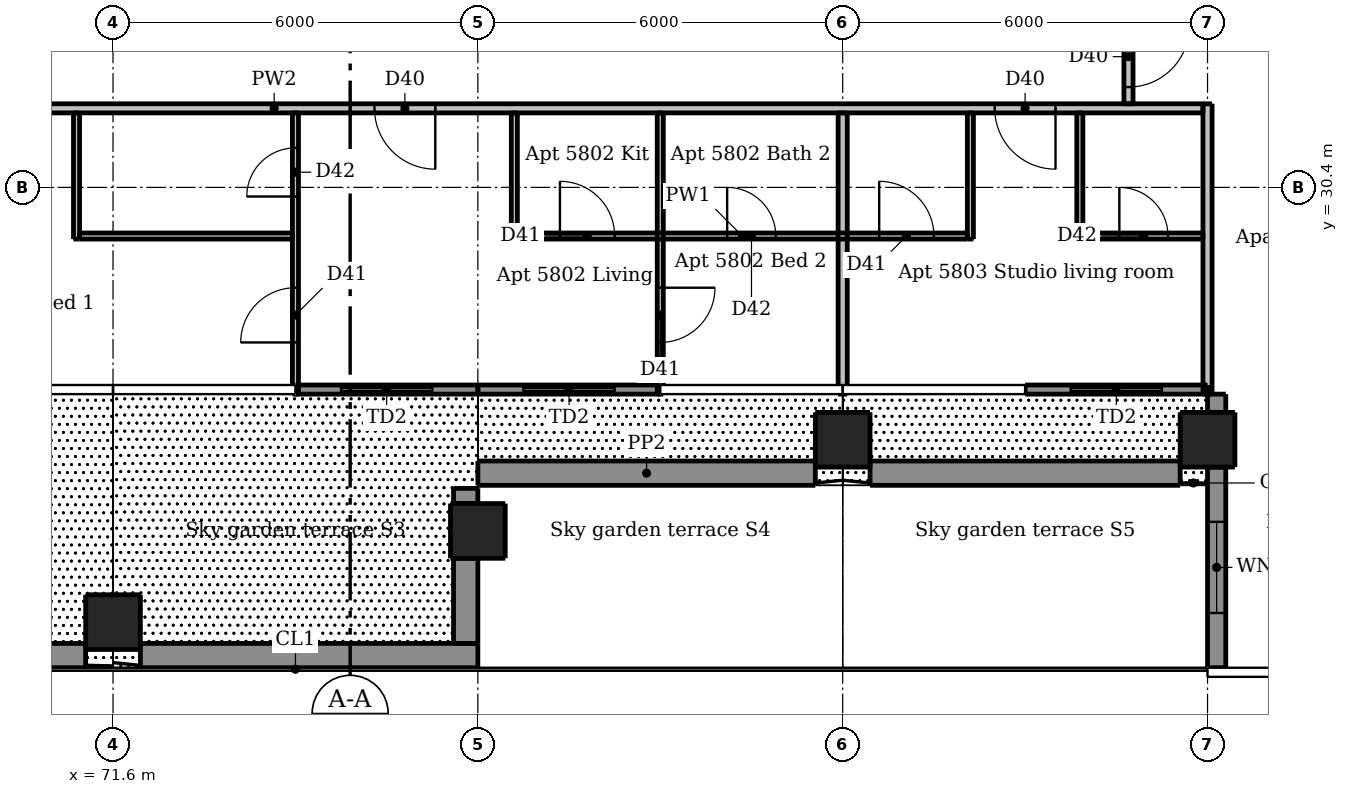
"""IFC4 building model, lengths in metres.
Left out: names, types, materials, properties, quantities, classifications, styles, units other than length and angle.
Written with IfcOpenShell. Run it as: python <this file> out.ifc"""

import sys

from ifc_helpers import new_model, si_unit, direction, frame, frame_2d, origin, origin_2d, place, context, subcontext, project, spatial, rectangle, extrude, element, fill, save


model = new_model("IFC4")
c1 = context("Model", 3, precision=1e-05, world=origin(), true_north=direction((0.0, 1.0)))
c2 = subcontext(c1, "Body", "Model", "MODEL_VIEW")
j1 = project(units=[si_unit("LENGTHUNIT", "METRE"), si_unit("PLANEANGLEUNIT", "RADIAN")], contexts=[c1])
p1 = place(None, origin())
s1 = spatial("IfcSite", under=j1, at=p1, CompositionType="ELEMENT")
p2 = place(p1, origin())
s2 = spatial("IfcBuilding", under=s1, at=p2, CompositionType="ELEMENT")
p3 = place(p2, frame((0.0, 0.0, 216.7)))
s3 = spatial("IfcBuildingStorey", under=s2, at=p3, CompositionType="ELEMENT", Elevation=216.7)
for number, where, z_axis, x_axis in (
    (1, (71.6, 23.25, 0.0), (0.0, 0.0, 1.0), (1.0, 0.0, 0.0)),
    (2, (77.6, 24.75, 0.0), (0.0, 0.0, 1.0), (1.0, 0.0, 0.0)),
    (3, (83.6, 26.25, 0.0), (0.0, 0.0, 1.0), (1.0, 0.0, 0.0)),
):
    element("IfcColumn", number, at=place(p3, frame(where, z_axis=z_axis, x_axis=x_axis)), inside=s3, PredefinedType="COLUMN", context=c2, shape_type="SweptSolid", body=[
        extrude(rectangle(XDim=0.9, YDim=0.9, at=origin_2d()), origin(), (0.0, 0.0, 1.0), 3.3),
    ])
p4 = place(p3, frame((89.6, 26.25, 0.0), z_axis=(0.0, 0.0, 1.0), x_axis=(1.0, 0.0, 0.0)))
e4 = element("IfcColumn", 4, at=p4, inside=s3, PredefinedType="COLUMN", context=c2, shape_type="SweptSolid", body=[
    extrude(rectangle(XDim=0.9, YDim=0.9, at=origin_2d()), origin(), (0.0, 0.0, 1.0), 3.05),
])
p5 = place(p3, frame((89.75, 27.0, 0.0), z_axis=(0.0, 0.0, 1.0), x_axis=(0.0, -1.0, 0.0)))
e5 = element("IfcWall", 5, at=p5, inside=s3, PredefinedType="SOLIDWALL", context=c2, shape_type="SweptSolid", body=[
    extrude(rectangle(XDim=0.3, YDim=0.3, at=frame_2d((0.15, 0.0))), origin(), (0.0, 0.0, 1.0), 3.05),
])
p6 = place(p3, frame((89.75, 25.8, 0.0), z_axis=(0.0, 0.0, 1.0), x_axis=(0.0, -1.0, 0.0)))
e6 = element("IfcWall", 6, at=p6, inside=s3, PredefinedType="SOLIDWALL", context=c2, shape_type="SweptSolid", body=[
    extrude(rectangle(XDim=3.3, YDim=0.3, at=frame_2d((1.65, 0.0))), origin(), (0.0, 0.0, 1.0), 3.05),
])
p7 = place(p6, frame((0.9, 0.0, 0.9)))
e7 = element("IfcOpeningElement", 7, at=p7, cuts=e6, PredefinedType="OPENING", context=c2, shape_type="SweptSolid", body=[
    extrude(rectangle(XDim=1.5, YDim=1.5, at=frame_2d((0.75, 0.75))), frame((0.0, 0.16, 0.0), z_axis=(0.0, -1.0, 0.0), x_axis=(1.0, 0.0, 0.0)), (0.0, 0.0, 1.0), 0.32),
])
p8 = place(p3, frame((74.6, 27.075, 0.0), z_axis=(0.0, 0.0, 1.0), x_axis=(1.0, 0.0, 0.0)))
e8 = element("IfcWall", 8, at=p8, inside=s3, PredefinedType="SOLIDWALL", context=c2, shape_type="SweptSolid", body=[
    extrude(rectangle(XDim=3.0, YDim=0.15, at=frame_2d((1.5, 0.0))), origin(), (0.0, 0.0, 1.0), 3.05),
])
p9 = place(p8, frame((0.75, 0.0, 0.0)))
e9 = element("IfcOpeningElement", 9, at=p9, cuts=e8, PredefinedType="OPENING", context=c2, shape_type="SweptSolid", body=[
    extrude(rectangle(XDim=1.5, YDim=2.4, at=frame_2d((0.75, 1.2))), frame((0.0, 0.085, 0.0), z_axis=(0.0, -1.0, 0.0), x_axis=(1.0, 0.0, 0.0)), (0.0, 0.0, 1.0), 0.17),
])
p10 = place(p3, frame((77.6, 27.075, 0.0), z_axis=(0.0, 0.0, 1.0), x_axis=(1.0, 0.0, 0.0)))
e10 = element("IfcWall", 10, at=p10, inside=s3, PredefinedType="SOLIDWALL", context=c2, shape_type="SweptSolid", body=[
    extrude(rectangle(XDim=3.0, YDim=0.15, at=frame_2d((1.5, 0.0))), origin(), (0.0, 0.0, 1.0), 3.05),
])
p11 = place(p10, frame((0.75, 0.0, 0.0)))
e11 = element("IfcOpeningElement", 11, at=p11, cuts=e10, PredefinedType="OPENING", context=c2, shape_type="SweptSolid", body=[
    extrude(rectangle(XDim=1.5, YDim=2.4, at=frame_2d((0.75, 1.2))), frame((0.0, 0.085, 0.0), z_axis=(0.0, -1.0, 0.0), x_axis=(1.0, 0.0, 0.0)), (0.0, 0.0, 1.0), 0.17),
])
p12 = place(p3, frame((86.6, 27.075, 0.0), z_axis=(0.0, 0.0, 1.0), x_axis=(1.0, 0.0, 0.0)))
e12 = element("IfcWall", 12, at=p12, inside=s3, PredefinedType="SOLIDWALL", context=c2, shape_type="SweptSolid", body=[
    extrude(rectangle(XDim=3.0, YDim=0.15, at=frame_2d((1.5, 0.0))), origin(), (0.0, 0.0, 1.0), 3.05),
])
p13 = place(p12, frame((0.75, 0.0, 0.0)))
e13 = element("IfcOpeningElement", 13, at=p13, cuts=e12, PredefinedType="OPENING", context=c2, shape_type="SweptSolid", body=[
    extrude(rectangle(XDim=1.5, YDim=2.4, at=frame_2d((0.75, 1.2))), frame((0.0, 0.085, 0.0), z_axis=(0.0, -1.0, 0.0), x_axis=(1.0, 0.0, 0.0)), (0.0, 0.0, 1.0), 0.17),
])
p14 = place(p3, frame((66.05, 22.7, 0.03), z_axis=(0.0, 0.0, 1.0), x_axis=(1.0, 0.0, 0.0)))
e14 = element("IfcWall", 14, at=p14, inside=s3, PredefinedType="PARAPET", context=c2, shape_type="SweptSolid", body=[
    extrude(rectangle(XDim=5.1, YDim=0.4, at=frame_2d((2.55, 0.0))), origin(), (0.0, 0.0, 1.0), 1.1),
])
p15 = place(p3, frame((72.05, 22.7, 0.03), z_axis=(0.0, 0.0, 1.0), x_axis=(1.0, 0.0, 0.0)))
e15 = element("IfcWall", 15, at=p15, inside=s3, PredefinedType="PARAPET", context=c2, shape_type="SweptSolid", body=[
    extrude(rectangle(XDim=5.55, YDim=0.4, at=frame_2d((2.775, 0.0))), origin(), (0.0, 0.0, 1.0), 1.1),
])
p16 = place(p3, frame((77.4, 22.9, 0.03), z_axis=(0.0, 0.0, 1.0), x_axis=(0.0, 1.0, 0.0)))
e16 = element("IfcWall", 16, at=p16, inside=s3, PredefinedType="PARAPET", context=c2, shape_type="SweptSolid", body=[
    extrude(rectangle(XDim=1.4, YDim=0.4, at=frame_2d((0.7, 0.0))), origin(), (0.0, 0.0, 1.0), 1.1),
])
p17 = place(p3, frame((77.4, 25.2, 0.03), z_axis=(0.0, 0.0, 1.0), x_axis=(0.0, 1.0, 0.0)))
e17 = element("IfcWall", 17, at=p17, inside=s3, PredefinedType="PARAPET", context=c2, shape_type="SweptSolid", body=[
    extrude(rectangle(XDim=0.25, YDim=0.4, at=frame_2d((0.125, 0.0))), origin(), (0.0, 0.0, 1.0), 1.1),
])
p18 = place(p3, frame((77.6, 25.7, 0.03), z_axis=(0.0, 0.0, 1.0), x_axis=(1.0, 0.0, 0.0)))
e18 = element("IfcWall", 18, at=p18, inside=s3, PredefinedType="PARAPET", context=c2, shape_type="SweptSolid", body=[
    extrude(rectangle(XDim=5.55, YDim=0.4, at=frame_2d((2.775, 0.0))), origin(), (0.0, 0.0, 1.0), 1.1),
])
p19 = place(p3, frame((84.05, 25.7, 0.03), z_axis=(0.0, 0.0, 1.0), x_axis=(1.0, 0.0, 0.0)))
e19 = element("IfcWall", 19, at=p19, inside=s3, PredefinedType="PARAPET", context=c2, shape_type="SweptSolid", body=[
    extrude(rectangle(XDim=5.1, YDim=0.4, at=frame_2d((2.55, 0.0))), origin(), (0.0, 0.0, 1.0), 1.1),
])
p20 = place(p3, frame((71.0, 29.55, 0.0), z_axis=(0.0, 0.0, 1.0), x_axis=(0.0, 1.0, 0.0)))
e20 = element("IfcWall", 20, at=p20, inside=s3, PredefinedType="PARTITIONING", context=c2, shape_type="SweptSolid", body=[
    extrude(rectangle(XDim=2.075, YDim=0.1, at=frame_2d((1.038, 0.0))), origin(), (0.0, 0.0, 1.0), 3.05),
])
p21 = place(p3, frame((74.6, 27.0, 0.0), z_axis=(0.0, 0.0, 1.0), x_axis=(0.0, 1.0, 0.0)))
e21 = element("IfcWall", 21, at=p21, inside=s3, PredefinedType="PARTITIONING", context=c2, shape_type="SweptSolid", body=[
    extrude(rectangle(XDim=4.625, YDim=0.1, at=frame_2d((2.312, 0.0))), origin(), (0.0, 0.0, 1.0), 3.05),
])
p22 = place(p21, frame((0.85, 0.0, 0.0)))
e22 = element("IfcOpeningElement", 22, at=p22, cuts=e21, PredefinedType="OPENING", context=c2, shape_type="SweptSolid", body=[
    extrude(rectangle(XDim=0.9, YDim=2.1, at=frame_2d((0.45, 1.05))), frame((0.0, 0.06, 0.0), z_axis=(0.0, -1.0, 0.0), x_axis=(1.0, 0.0, 0.0)), (0.0, 0.0, 1.0), 0.12),
])
p23 = place(p21, frame((3.25, 0.0, 0.0)))
e23 = element("IfcOpeningElement", 23, at=p23, cuts=e21, PredefinedType="OPENING", context=c2, shape_type="SweptSolid", body=[
    extrude(rectangle(XDim=0.8, YDim=2.1, at=frame_2d((0.4, 1.05))), frame((0.0, 0.06, 0.0), z_axis=(0.0, -1.0, 0.0), x_axis=(1.0, 0.0, 0.0)), (0.0, 0.0, 1.0), 0.12),
])
p24 = place(p3, frame((78.2, 29.55, 0.0), z_axis=(0.0, 0.0, 1.0), x_axis=(0.0, 1.0, 0.0)))
e24 = element("IfcWall", 24, at=p24, inside=s3, PredefinedType="PARTITIONING", context=c2, shape_type="SweptSolid", body=[
    extrude(rectangle(XDim=2.075, YDim=0.1, at=frame_2d((1.038, 0.0))), origin(), (0.0, 0.0, 1.0), 3.05),
])
p25 = place(p3, frame((80.6, 31.625, 0.0), z_axis=(0.0, 0.0, 1.0), x_axis=(0.0, -1.0, 0.0)))
e25 = element("IfcWall", 25, at=p25, inside=s3, PredefinedType="PARTITIONING", context=c2, shape_type="SweptSolid", body=[
    extrude(rectangle(XDim=4.625, YDim=0.1, at=frame_2d((2.312, 0.0))), origin(), (0.0, 0.0, 1.0), 3.05),
])
p26 = place(p25, frame((2.875, 0.0, 0.0)))
e26 = element("IfcOpeningElement", 26, at=p26, cuts=e25, PredefinedType="OPENING", context=c2, shape_type="SweptSolid", body=[
    extrude(rectangle(XDim=0.9, YDim=2.1, at=frame_2d((0.45, 1.05))), frame((0.0, 0.06, 0.0), z_axis=(0.0, -1.0, 0.0), x_axis=(1.0, 0.0, 0.0)), (0.0, 0.0, 1.0), 0.12),
])
for number, where, z_axis, x_axis in (
    (27, (85.7, 29.55, 0.0), (0.0, 0.0, 1.0), (0.0, 1.0, 0.0)),
    (28, (87.5, 29.55, 0.0), (0.0, 0.0, 1.0), (0.0, 1.0, 0.0)),
):
    element("IfcWall", number, at=place(p3, frame(where, z_axis=z_axis, x_axis=x_axis)), inside=s3, PredefinedType="PARTITIONING", context=c2, shape_type="SweptSolid", body=[
        extrude(rectangle(XDim=2.075, YDim=0.1, at=frame_2d((1.038, 0.0))), origin(), (0.0, 0.0, 1.0), 3.05),
    ])
p27 = place(p3, frame((71.05, 29.6, 0.0), z_axis=(0.0, 0.0, 1.0), x_axis=(1.0, 0.0, 0.0)))
e29 = element("IfcWall", 29, at=p27, inside=s3, PredefinedType="PARTITIONING", context=c2, shape_type="SweptSolid", body=[
    extrude(rectangle(XDim=3.5, YDim=0.1, at=frame_2d((1.75, 0.0))), origin(), (0.0, 0.0, 1.0), 3.05),
])
p28 = place(p3, frame((78.25, 29.6, 0.0), z_axis=(0.0, 0.0, 1.0), x_axis=(1.0, 0.0, 0.0)))
e30 = element("IfcWall", 30, at=p28, inside=s3, PredefinedType="PARTITIONING", context=c2, shape_type="SweptSolid", body=[
    extrude(rectangle(XDim=7.4, YDim=0.1, at=frame_2d((3.7, 0.0))), origin(), (0.0, 0.0, 1.0), 3.05),
])
p29 = place(p28, frame((0.7, 0.0, 0.0)))
e31 = element("IfcOpeningElement", 31, at=p29, cuts=e30, PredefinedType="OPENING", context=c2, shape_type="SweptSolid", body=[
    extrude(rectangle(XDim=0.9, YDim=2.1, at=frame_2d((0.45, 1.05))), frame((0.0, 0.06, 0.0), z_axis=(0.0, -1.0, 0.0), x_axis=(1.0, 0.0, 0.0)), (0.0, 0.0, 1.0), 0.12),
])
p30 = place(p28, frame((3.45, 0.0, 0.0)))
e32 = element("IfcOpeningElement", 32, at=p30, cuts=e30, PredefinedType="OPENING", context=c2, shape_type="SweptSolid", body=[
    extrude(rectangle(XDim=0.8, YDim=2.1, at=frame_2d((0.4, 1.05))), frame((0.0, 0.06, 0.0), z_axis=(0.0, -1.0, 0.0), x_axis=(1.0, 0.0, 0.0)), (0.0, 0.0, 1.0), 0.12),
])
p31 = place(p28, frame((5.95, 0.0, 0.0)))
e33 = element("IfcOpeningElement", 33, at=p31, cuts=e30, PredefinedType="OPENING", context=c2, shape_type="SweptSolid", body=[
    extrude(rectangle(XDim=0.9, YDim=2.1, at=frame_2d((0.45, 1.05))), frame((0.0, 0.06, 0.0), z_axis=(0.0, -1.0, 0.0), x_axis=(1.0, 0.0, 0.0)), (0.0, 0.0, 1.0), 0.12),
])
p32 = place(p3, frame((87.55, 29.6, 0.0), z_axis=(0.0, 0.0, 1.0), x_axis=(1.0, 0.0, 0.0)))
e34 = element("IfcWall", 34, at=p32, inside=s3, PredefinedType="PARTITIONING", context=c2, shape_type="SweptSolid", body=[
    extrude(rectangle(XDim=1.975, YDim=0.1, at=frame_2d((0.987, 0.0))), origin(), (0.0, 0.0, 1.0), 3.05),
])
p33 = place(p32, frame((0.6, 0.0, 0.0)))
e35 = element("IfcOpeningElement", 35, at=p33, cuts=e34, PredefinedType="OPENING", context=c2, shape_type="SweptSolid", body=[
    extrude(rectangle(XDim=0.8, YDim=2.1, at=frame_2d((0.4, 1.05))), frame((0.0, 0.06, 0.0), z_axis=(0.0, -1.0, 0.0), x_axis=(1.0, 0.0, 0.0)), (0.0, 0.0, 1.0), 0.12),
])
p34 = place(p3, frame((83.6, 27.0, 0.0), z_axis=(0.0, 0.0, 1.0), x_axis=(0.0, 1.0, 0.0)))
e36 = element("IfcWall", 36, at=p34, inside=s3, PredefinedType="PARTITIONING", context=c2, shape_type="SweptSolid", body=[
    extrude(rectangle(XDim=4.625, YDim=0.15, at=frame_2d((2.312, 0.0))), origin(), (0.0, 0.0, 1.0), 2.59),
])
p35 = place(p3, frame((88.3, 61.175, 0.0), z_axis=(0.0, 0.0, 1.0), x_axis=(0.0, -1.0, 0.0)))
e37 = element("IfcWall", 37, at=p35, inside=s3, PredefinedType="PARTITIONING", context=c2, shape_type="SweptSolid", body=[
    extrude(rectangle(XDim=29.4, YDim=0.15, at=frame_2d((14.7, 0.0))), origin(), (0.0, 0.0, 1.0), 3.05),
])
p36 = place(p35, frame((28.125, 0.0, 0.0)))
e38 = element("IfcOpeningElement", 38, at=p36, cuts=e37, PredefinedType="OPENING", context=c2, shape_type="SweptSolid", body=[
    extrude(rectangle(XDim=1.0, YDim=2.1, at=frame_2d((0.5, 1.05))), frame((0.0, 0.085, 0.0), z_axis=(0.0, -1.0, 0.0), x_axis=(1.0, 0.0, 0.0)), (0.0, 0.0, 1.0), 0.17),
])
p37 = place(p35, frame((15.275, 0.0, 0.0)))
e39 = element("IfcOpeningElement", 39, at=p37, cuts=e37, PredefinedType="OPENING", context=c2, shape_type="SweptSolid", body=[
    extrude(rectangle(XDim=1.0, YDim=2.1, at=frame_2d((0.5, 1.05))), frame((0.0, 0.085, 0.0), z_axis=(0.0, -1.0, 0.0), x_axis=(1.0, 0.0, 0.0)), (0.0, 0.0, 1.0), 0.17),
])
p38 = place(p35, frame((5.075, 0.0, 0.0)))
e40 = element("IfcOpeningElement", 40, at=p38, cuts=e37, PredefinedType="OPENING", context=c2, shape_type="SweptSolid", body=[
    extrude(rectangle(XDim=1.0, YDim=2.1, at=frame_2d((0.5, 1.05))), frame((0.0, 0.085, 0.0), z_axis=(0.0, -1.0, 0.0), x_axis=(1.0, 0.0, 0.0)), (0.0, 0.0, 1.0), 0.17),
])
p39 = place(p3, frame((89.6, 27.0, 0.0), z_axis=(0.0, 0.0, 1.0), x_axis=(0.0, 1.0, 0.0)))
e41 = element("IfcWall", 41, at=p39, inside=s3, PredefinedType="PARTITIONING", context=c2, shape_type="SweptSolid", body=[
    extrude(rectangle(XDim=4.775, YDim=0.15, at=frame_2d((2.387, 0.0))), origin(), (0.0, 0.0, 1.0), 2.516),
])
p40 = place(p3, frame((89.525, 31.7, 0.0), z_axis=(0.0, 0.0, 1.0), x_axis=(-1.0, 0.0, 0.0)))
e42 = element("IfcWall", 42, at=p40, inside=s3, PredefinedType="PARTITIONING", context=c2, shape_type="SweptSolid", body=[
    extrude(rectangle(XDim=30.55, YDim=0.15, at=frame_2d((15.275, 0.0))), origin(), (0.0, 0.0, 1.0), 3.05),
])
p41 = place(p40, frame((28.275, 0.0, 0.0)))
e43 = element("IfcOpeningElement", 43, at=p41, cuts=e42, PredefinedType="OPENING", context=c2, shape_type="SweptSolid", body=[
    extrude(rectangle(XDim=1.0, YDim=2.1, at=frame_2d((0.5, 1.05))), frame((0.0, 0.085, 0.0), z_axis=(0.0, -1.0, 0.0), x_axis=(1.0, 0.0, 0.0)), (0.0, 0.0, 1.0), 0.17),
])
p42 = place(p40, frame((12.625, 0.0, 0.0)))
e44 = element("IfcOpeningElement", 44, at=p42, cuts=e42, PredefinedType="OPENING", context=c2, shape_type="SweptSolid", body=[
    extrude(rectangle(XDim=1.0, YDim=2.1, at=frame_2d((0.5, 1.05))), frame((0.0, 0.085, 0.0), z_axis=(0.0, -1.0, 0.0), x_axis=(1.0, 0.0, 0.0)), (0.0, 0.0, 1.0), 0.17),
])
p43 = place(p40, frame((2.425, 0.0, 0.0)))
e45 = element("IfcOpeningElement", 45, at=p43, cuts=e42, PredefinedType="OPENING", context=c2, shape_type="SweptSolid", body=[
    extrude(rectangle(XDim=1.0, YDim=2.1, at=frame_2d((0.5, 1.05))), frame((0.0, 0.085, 0.0), z_axis=(0.0, -1.0, 0.0), x_axis=(1.0, 0.0, 0.0)), (0.0, 0.0, 1.0), 0.17),
])
p44 = place(p7, origin())
e46 = element("IfcWindow", 46, at=p44, inside=s3, PartitioningType="DOUBLE_PANEL_VERTICAL", PredefinedType="WINDOW", context=c2, shape_type="SweptSolid", body=[
    extrude(rectangle(XDim=1.5, YDim=1.5, at=frame_2d((0.75, 0.75))), frame((0.0, 0.03, 0.0), z_axis=(0.0, -1.0, 0.0), x_axis=(1.0, 0.0, 0.0)), (0.0, 0.0, 1.0), 0.06),
])
fill(e7, e46)
p45 = place(p9, origin())
e47 = element("IfcDoor", 47, at=p45, inside=s3, OperationType="DOUBLE_DOOR_SLIDING", PredefinedType="DOOR", context=c2, shape_type="SweptSolid", body=[
    extrude(rectangle(XDim=1.5, YDim=2.4, at=frame_2d((0.75, 1.2))), frame((0.0, 0.025, 0.0), z_axis=(0.0, -1.0, 0.0), x_axis=(1.0, 0.0, 0.0)), (0.0, 0.0, 1.0), 0.05),
])
fill(e9, e47)
p46 = place(p11, origin())
e48 = element("IfcDoor", 48, at=p46, inside=s3, OperationType="DOUBLE_DOOR_SLIDING", PredefinedType="DOOR", context=c2, shape_type="SweptSolid", body=[
    extrude(rectangle(XDim=1.5, YDim=2.4, at=frame_2d((0.75, 1.2))), frame((0.0, 0.025, 0.0), z_axis=(0.0, -1.0, 0.0), x_axis=(1.0, 0.0, 0.0)), (0.0, 0.0, 1.0), 0.05),
])
fill(e11, e48)
p47 = place(p13, origin())
e49 = element("IfcDoor", 49, at=p47, inside=s3, OperationType="DOUBLE_DOOR_SLIDING", PredefinedType="DOOR", context=c2, shape_type="SweptSolid", body=[
    extrude(rectangle(XDim=1.5, YDim=2.4, at=frame_2d((0.75, 1.2))), frame((0.0, 0.025, 0.0), z_axis=(0.0, -1.0, 0.0), x_axis=(1.0, 0.0, 0.0)), (0.0, 0.0, 1.0), 0.05),
])
fill(e13, e49)
p48 = place(p42, origin())
e50 = element("IfcDoor", 50, at=p48, inside=s3, OperationType="SINGLE_SWING_LEFT", PredefinedType="DOOR", context=c2, shape_type="SweptSolid", body=[
    extrude(rectangle(XDim=1.0, YDim=2.1, at=frame_2d((0.5, 1.05))), frame((0.0, 0.025, 0.0), z_axis=(0.0, -1.0, 0.0), x_axis=(1.0, 0.0, 0.0)), (0.0, 0.0, 1.0), 0.05),
])
fill(e44, e50)
p49 = place(p29, origin())
e51 = element("IfcDoor", 51, at=p49, inside=s3, OperationType="SINGLE_SWING_LEFT", PredefinedType="DOOR", context=c2, shape_type="SweptSolid", body=[
    extrude(rectangle(XDim=0.9, YDim=2.1, at=frame_2d((0.45, 1.05))), frame((0.0, 0.025, 0.0), z_axis=(0.0, -1.0, 0.0), x_axis=(1.0, 0.0, 0.0)), (0.0, 0.0, 1.0), 0.05),
])
fill(e31, e51)
p50 = place(p22, origin())
e52 = element("IfcDoor", 52, at=p50, inside=s3, OperationType="SINGLE_SWING_LEFT", PredefinedType="DOOR", context=c2, shape_type="SweptSolid", body=[
    extrude(rectangle(XDim=0.9, YDim=2.1, at=frame_2d((0.45, 1.05))), frame((0.0, 0.025, 0.0), z_axis=(0.0, -1.0, 0.0), x_axis=(1.0, 0.0, 0.0)), (0.0, 0.0, 1.0), 0.05),
])
fill(e22, e52)
p51 = place(p23, origin())
e53 = element("IfcDoor", 53, at=p51, inside=s3, OperationType="SINGLE_SWING_LEFT", PredefinedType="DOOR", context=c2, shape_type="SweptSolid", body=[
    extrude(rectangle(XDim=0.8, YDim=2.1, at=frame_2d((0.4, 1.05))), frame((0.0, 0.025, 0.0), z_axis=(0.0, -1.0, 0.0), x_axis=(1.0, 0.0, 0.0)), (0.0, 0.0, 1.0), 0.05),
])
fill(e23, e53)
p52 = place(p26, origin())
e54 = element("IfcDoor", 54, at=p52, inside=s3, OperationType="SINGLE_SWING_LEFT", PredefinedType="DOOR", context=c2, shape_type="SweptSolid", body=[
    extrude(rectangle(XDim=0.9, YDim=2.1, at=frame_2d((0.45, 1.05))), frame((0.0, 0.025, 0.0), z_axis=(0.0, -1.0, 0.0), x_axis=(1.0, 0.0, 0.0)), (0.0, 0.0, 1.0), 0.05),
])
fill(e26, e54)
p53 = place(p30, origin())
e55 = element("IfcDoor", 55, at=p53, inside=s3, OperationType="SINGLE_SWING_LEFT", PredefinedType="DOOR", context=c2, shape_type="SweptSolid", body=[
    extrude(rectangle(XDim=0.8, YDim=2.1, at=frame_2d((0.4, 1.05))), frame((0.0, 0.025, 0.0), z_axis=(0.0, -1.0, 0.0), x_axis=(1.0, 0.0, 0.0)), (0.0, 0.0, 1.0), 0.05),
])
fill(e32, e55)
p54 = place(p43, origin())
e56 = element("IfcDoor", 56, at=p54, inside=s3, OperationType="SINGLE_SWING_LEFT", PredefinedType="DOOR", context=c2, shape_type="SweptSolid", body=[
    extrude(rectangle(XDim=1.0, YDim=2.1, at=frame_2d((0.5, 1.05))), frame((0.0, 0.025, 0.0), z_axis=(0.0, -1.0, 0.0), x_axis=(1.0, 0.0, 0.0)), (0.0, 0.0, 1.0), 0.05),
])
fill(e45, e56)
p55 = place(p31, origin())
e57 = element("IfcDoor", 57, at=p55, inside=s3, OperationType="SINGLE_SWING_LEFT", PredefinedType="DOOR", context=c2, shape_type="SweptSolid", body=[
    extrude(rectangle(XDim=0.9, YDim=2.1, at=frame_2d((0.45, 1.05))), frame((0.0, 0.025, 0.0), z_axis=(0.0, -1.0, 0.0), x_axis=(1.0, 0.0, 0.0)), (0.0, 0.0, 1.0), 0.05),
])
fill(e33, e57)
p56 = place(p33, origin())
e58 = element("IfcDoor", 58, at=p56, inside=s3, OperationType="SINGLE_SWING_LEFT", PredefinedType="DOOR", context=c2, shape_type="SweptSolid", body=[
    extrude(rectangle(XDim=0.8, YDim=2.1, at=frame_2d((0.4, 1.05))), frame((0.0, 0.025, 0.0), z_axis=(0.0, -1.0, 0.0), x_axis=(1.0, 0.0, 0.0)), (0.0, 0.0, 1.0), 0.05),
])
fill(e35, e58)
p57 = place(p36, origin())
e59 = element("IfcDoor", 59, at=p57, inside=s3, OperationType="SINGLE_SWING_LEFT", PredefinedType="DOOR", context=c2, shape_type="SweptSolid", body=[
    extrude(rectangle(XDim=1.0, YDim=2.1, at=frame_2d((0.5, 1.05))), frame((0.0, 0.025, 0.0), z_axis=(0.0, -1.0, 0.0), x_axis=(1.0, 0.0, 0.0)), (0.0, 0.0, 1.0), 0.05),
])
fill(e38, e59)
save(model, sys.argv[1])
